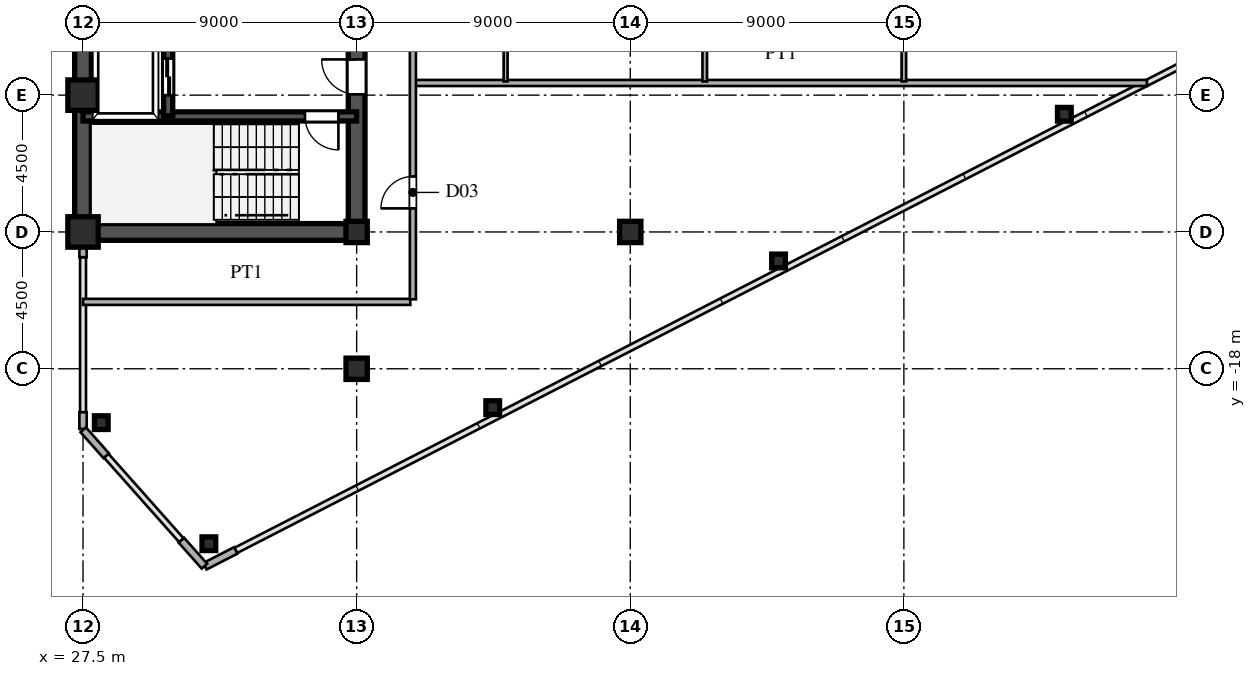
"""IFC4 building model, lengths in metres.
Left out: names, types, materials, properties, quantities, classifications, styles, units other than length and angle.
Written with IfcOpenShell. Run it as: python <this file> out.ifc"""

import sys

from ifc_helpers import new_model, si_unit, direction, frame, frame_2d, origin, origin_2d, place, context, subcontext, project, spatial, rectangle, hollow_rectangle, i_section, extrude, source, transform, mapped, element, fill, save


model = new_model("IFC4")
c1 = context("Model", 3, precision=1e-05, world=origin(), true_north=direction((0.0, 1.0)))
c2 = subcontext(c1, "Body", "Model", "MODEL_VIEW")
j1 = project(units=[si_unit("LENGTHUNIT", "METRE"), si_unit("PLANEANGLEUNIT", "RADIAN")], contexts=[c1])
p1 = place(None, origin())
s1 = spatial("IfcSite", under=j1, at=p1, CompositionType="ELEMENT")
p2 = place(p1, origin())
s2 = spatial("IfcBuilding", under=s1, at=p2, CompositionType="ELEMENT")
p3 = place(p2, frame((0.0, 0.0, 151.2)))
s3 = spatial("IfcBuildingStorey", under=s2, at=p3, CompositionType="ELEMENT", Elevation=151.2)
m1 = source(origin(), c2, "Body", "SweptSolid", [
    extrude(hollow_rectangle(XDim=1.0, YDim=1.0, WallThickness=0.042, at=origin_2d()), origin(), (0.0, 0.0, 1.0), 3.6),
])
for number, where, z_axis, x_axis in (
    (1, (27.5, -13.5, 0.0), (0.0, 0.0, 1.0), (1.0, 0.0, 0.0)),
    (2, (27.5, -9.0, 0.0), (0.0, 0.0, 1.0), (1.0, 0.0, 0.0)),
):
    element("IfcColumn", number, at=place(p3, frame(where, z_axis=z_axis, x_axis=x_axis)), inside=s3, PredefinedType="COLUMN", context=c2, shape_type="MappedRepresentation", body=[
        mapped(m1, transform((0.0, 0.0, 0.0), scale=1.0)),
    ])
m2 = source(origin(), c2, "Body", "SweptSolid", [
    extrude(i_section(OverallWidth=0.7, OverallDepth=0.7, WebThickness=0.028, FlangeThickness=0.045, at=origin_2d()), origin(), (0.0, 0.0, 1.0), 3.6),
])
for number, where, z_axis, x_axis in (
    (3, (36.5, -18.0, 0.0), (0.0, 0.0, 1.0), (1.0, 0.0, 0.0)),
    (4, (36.5, -13.5, 0.0), (0.0, 0.0, 1.0), (1.0, 0.0, 0.0)),
    (5, (45.5, -13.5, 0.0), (0.0, 0.0, 1.0), (1.0, 0.0, 0.0)),
):
    element("IfcColumn", number, at=place(p3, frame(where, z_axis=z_axis, x_axis=x_axis)), inside=s3, PredefinedType="COLUMN", context=c2, shape_type="MappedRepresentation", body=[
        mapped(m2, transform((0.0, 0.0, 0.0), scale=1.0)),
    ])
m3 = source(origin(), c2, "Body", "SweptSolid", [
    extrude(hollow_rectangle(XDim=0.45, YDim=0.45, WallThickness=0.018, at=origin_2d()), origin(), (0.0, 0.0, 1.0), 3.6),
])
for number, where, z_axis, x_axis in (
    (6, (31.64, -23.754, 0.0), (0.0, 0.0, 1.0), (1.0, 0.0, 0.0)),
    (7, (28.1, -19.772, 0.0), (0.0, 0.0, 1.0), (1.0, 0.0, 0.0)),
    (8, (40.976, -19.278, 0.0), (0.0, 0.0, 1.0), (1.0, 0.0, 0.0)),
    (9, (50.377, -14.453, 0.0), (0.0, 0.0, 1.0), (1.0, 0.0, 0.0)),
    (10, (59.779, -9.629, 0.0), (0.0, 0.0, 1.0), (1.0, 0.0, 0.0)),
):
    element("IfcColumn", number, at=place(p3, frame(where, z_axis=z_axis, x_axis=x_axis)), inside=s3, PredefinedType="COLUMN", context=c2, shape_type="MappedRepresentation", body=[
        mapped(m3, transform((0.0, 0.0, 0.0), scale=1.0)),
    ])
p4 = place(p3, frame((31.509, -24.495, 0.0), z_axis=(0.0, 0.0, 1.0), x_axis=(0.889797395748, 0.456355776255, 0.0)))
e11 = element("IfcWall", 11, at=p4, inside=s3, PredefinedType="SOLIDWALL", context=c2, shape_type="SweptSolid", body=[
    extrude(rectangle(XDim=1.14, YDim=0.24, at=frame_2d((0.57, 0.0))), origin(), (0.0, 0.0, 1.0), 3.38),
])
p5 = place(p3, frame((27.5, -19.98, 0.0), z_axis=(0.0, 0.0, 1.0), x_axis=(0.0, 1.0, 0.0)))
e12 = element("IfcWall", 12, at=p5, inside=s3, PredefinedType="SOLIDWALL", context=c2, shape_type="SweptSolid", body=[
    extrude(rectangle(XDim=0.55, YDim=0.24, at=frame_2d((0.275, 0.0))), origin(), (0.0, 0.0, 1.0), 3.38),
])
p6 = place(p3, frame((27.5, -14.33, 0.0), z_axis=(0.0, 0.0, 1.0), x_axis=(0.0, 1.0, 0.0)))
e13 = element("IfcWall", 13, at=p6, inside=s3, PredefinedType="SOLIDWALL", context=c2, shape_type="SweptSolid", body=[
    extrude(rectangle(XDim=0.55, YDim=0.24, at=frame_2d((0.275, 0.0))), origin(), (0.0, 0.0, 1.0), 2.88),
])
for number, where, z_axis, x_axis in (
    (14, (27.507, -20.008, 0.0), (0.0, 0.0, 1.0), (0.664, -0.747, 0.0)),
    (15, (30.736, -23.64, 0.0), (0.0, 0.0, 1.0), (0.664, -0.747, 0.0)),
):
    element("IfcWall", number, at=place(p3, frame(where, z_axis=z_axis, x_axis=x_axis)), inside=s3, PredefinedType="SOLIDWALL", context=c2, shape_type="SweptSolid", body=[
        extrude(rectangle(XDim=1.14, YDim=0.24, at=frame_2d((0.57, 0.0))), origin(), (0.0, 0.0, 1.0), 3.38),
    ])
p7 = place(p3, frame((27.5, -13.5, 0.0), z_axis=(0.0, 0.0, 1.0), x_axis=(0.0, 1.0, 0.0)))
e16 = element("IfcWall", 16, at=p7, inside=s3, PredefinedType="SHEAR", context=c2, shape_type="SweptSolid", body=[
    extrude(rectangle(XDim=12.2, YDim=0.55, at=frame_2d((6.1, 0.0))), origin(), (0.0, 0.0, 1.0), 3.38),
])
p8 = place(p3, frame((27.5, -13.5, 0.0), z_axis=(0.0, 0.0, 1.0), x_axis=(1.0, 0.0, 0.0)))
e17 = element("IfcWall", 17, at=p8, inside=s3, PredefinedType="SHEAR", context=c2, shape_type="SweptSolid", body=[
    extrude(rectangle(XDim=9.0, YDim=0.55, at=frame_2d((4.5, 0.0))), origin(), (0.0, 0.0, 1.0), 3.38),
])
p9 = place(p3, frame((36.5, -13.65, 0.0), z_axis=(0.0, 0.0, 1.0), x_axis=(0.0, 1.0, 0.0)))
e18 = element("IfcWall", 18, at=p9, inside=s3, PredefinedType="SHEAR", context=c2, shape_type="SweptSolid", body=[
    extrude(rectangle(XDim=7.15, YDim=0.55, at=frame_2d((3.575, 0.0))), origin(), (0.0, 0.0, 1.0), 3.38),
])
p10 = place(p9, frame((4.675, 0.0, 0.0)))
e19 = element("IfcOpeningElement", 19, at=p10, cuts=e18, PredefinedType="OPENING", context=c2, shape_type="SweptSolid", body=[
    extrude(rectangle(XDim=1.15, YDim=2.2, at=frame_2d((0.575, 1.1))), frame((0.0, 0.285, 0.0), z_axis=(0.0, -1.0, 0.0), x_axis=(1.0, 0.0, 0.0)), (0.0, 0.0, 1.0), 0.57),
])
p11 = place(p3, frame((27.5, -9.7, 0.0), z_axis=(0.0, 0.0, 1.0), x_axis=(1.0, 0.0, 0.0)))
e20 = element("IfcWall", 20, at=p11, inside=s3, PredefinedType="SHEAR", context=c2, shape_type="SweptSolid", body=[
    extrude(rectangle(XDim=9.0, YDim=0.3, at=frame_2d((4.5, 0.0))), origin(), (0.0, 0.0, 1.0), 3.38),
])
p12 = place(p11, frame((7.3, 0.0, 0.0)))
e21 = element("IfcOpeningElement", 21, at=p12, cuts=e20, PredefinedType="OPENING", context=c2, shape_type="SweptSolid", body=[
    extrude(rectangle(XDim=1.1, YDim=2.2, at=frame_2d((0.55, 1.1))), frame((0.0, 0.16, 0.0), z_axis=(0.0, -1.0, 0.0), x_axis=(1.0, 0.0, 0.0)), (0.0, 0.0, 1.0), 0.32),
])
p13 = place(p3, frame((30.3, -9.68, 0.0), z_axis=(0.0, 0.0, 1.0), x_axis=(0.0, 1.0, 0.0)))
e22 = element("IfcWall", 22, at=p13, inside=s3, PredefinedType="SHEAR", context=c2, shape_type="SweptSolid", body=[
    extrude(rectangle(XDim=2.56, YDim=0.3, at=frame_2d((1.28, 0.0))), origin(), (0.0, 0.0, 1.0), 3.38),
])
p14 = place(p13, frame((0.68, 0.0, 0.0)))
e23 = element("IfcOpeningElement", 23, at=p14, cuts=e22, PredefinedType="OPENING", context=c2, shape_type="SweptSolid", body=[
    extrude(rectangle(XDim=1.2, YDim=2.25, at=frame_2d((0.6, 1.125))), frame((0.0, 0.16, 0.0), z_axis=(0.0, -1.0, 0.0), x_axis=(1.0, 0.0, 0.0)), (0.0, 0.0, 1.0), 0.32),
])
p15 = place(p3, frame((27.5, -15.8, 0.0), z_axis=(0.0, 0.0, 1.0), x_axis=(1.0, 0.0, 0.0)))
e24 = element("IfcWall", 24, at=p15, inside=s3, PredefinedType="PARTITIONING", context=c2, shape_type="SweptSolid", body=[
    extrude(rectangle(XDim=10.765, YDim=0.2, at=frame_2d((5.382, 0.0))), origin(), (0.0, 0.0, 1.0), 3.38),
])
p16 = place(p3, frame((38.43, -8.6, 0.0), z_axis=(0.0, 0.0, 1.0), x_axis=(1.0, 0.0, 0.0)))
e25 = element("IfcWall", 25, at=p16, inside=s3, PredefinedType="PARTITIONING", context=c2, shape_type="SweptSolid", body=[
    extrude(rectangle(XDim=24.066, YDim=0.2, at=frame_2d((12.033, 0.0))), origin(), (0.0, 0.0, 1.0), 3.38),
])
p17 = place(p3, frame((38.35, -15.715, 0.0), z_axis=(0.0, 0.0, 1.0), x_axis=(0.0, 1.0, 0.0)))
e26 = element("IfcWall", 26, at=p17, inside=s3, PredefinedType="PARTITIONING", context=c2, shape_type="SweptSolid", body=[
    extrude(rectangle(XDim=31.43, YDim=0.2, at=frame_2d((15.715, 0.0))), origin(), (0.0, 0.0, 1.0), 3.38),
])
p18 = place(p17, frame((2.99, 0.0, 0.0)))
e27 = element("IfcOpeningElement", 27, at=p18, cuts=e26, PredefinedType="OPENING", context=c2, shape_type="SweptSolid", body=[
    extrude(rectangle(XDim=1.05, YDim=2.25, at=frame_2d((0.525, 1.125))), frame((0.0, 0.11, 0.0), z_axis=(0.0, -1.0, 0.0), x_axis=(1.0, 0.0, 0.0)), (0.0, 0.0, 1.0), 0.22),
])
p19 = place(p17, frame((12.895, 0.0, 0.0)))
e28 = element("IfcOpeningElement", 28, at=p19, cuts=e26, PredefinedType="OPENING", context=c2, shape_type="SweptSolid", body=[
    extrude(rectangle(XDim=1.05, YDim=2.25, at=frame_2d((0.525, 1.125))), frame((0.0, 0.11, 0.0), z_axis=(0.0, -1.0, 0.0), x_axis=(1.0, 0.0, 0.0)), (0.0, 0.0, 1.0), 0.22),
])
p20 = place(p17, frame((20.988, 0.0, 0.0)))
e29 = element("IfcOpeningElement", 29, at=p20, cuts=e26, PredefinedType="OPENING", context=c2, shape_type="SweptSolid", body=[
    extrude(rectangle(XDim=1.05, YDim=2.25, at=frame_2d((0.525, 1.125))), frame((0.0, 0.11, 0.0), z_axis=(0.0, -1.0, 0.0), x_axis=(1.0, 0.0, 0.0)), (0.0, 0.0, 1.0), 0.22),
])
p21 = place(p3, frame((41.4, -8.55, 0.0), z_axis=(0.0, 0.0, 1.0), x_axis=(0.0, 1.0, 0.0)))
e30 = element("IfcWall", 30, at=p21, inside=s3, PredefinedType="PARTITIONING", context=c2, shape_type="SweptSolid", body=[
    extrude(rectangle(XDim=3.408, YDim=0.13, at=frame_2d((1.704, 0.0))), origin(), (0.0, 0.0, 1.0), 3.38),
])
p22 = place(p3, frame((47.95, -8.55, 0.0), z_axis=(0.0, 0.0, 1.0), x_axis=(0.0, 1.0, 0.0)))
e31 = element("IfcWall", 31, at=p22, inside=s3, PredefinedType="PARTITIONING", context=c2, shape_type="SweptSolid", body=[
    extrude(rectangle(XDim=22.913, YDim=0.15, at=frame_2d((11.457, 0.0))), origin(), (0.0, 0.0, 1.0), 3.38),
])
p23 = place(p22, frame((5.975, 0.0, 0.0)))
e32 = element("IfcOpeningElement", 32, at=p23, cuts=e31, PredefinedType="OPENING", context=c2, shape_type="SweptSolid", body=[
    extrude(rectangle(XDim=0.95, YDim=2.15, at=frame_2d((0.475, 1.075))), frame((0.0, 0.085, 0.0), z_axis=(0.0, -1.0, 0.0), x_axis=(1.0, 0.0, 0.0)), (0.0, 0.0, 1.0), 0.17),
])
p24 = place(p22, frame((1.642, 0.0, 0.0)))
e33 = element("IfcOpeningElement", 33, at=p24, cuts=e31, PredefinedType="OPENING", context=c2, shape_type="SweptSolid", body=[
    extrude(rectangle(XDim=0.95, YDim=2.15, at=frame_2d((0.475, 1.075))), frame((0.0, 0.085, 0.0), z_axis=(0.0, -1.0, 0.0), x_axis=(1.0, 0.0, 0.0)), (0.0, 0.0, 1.0), 0.17),
])
p25 = place(p22, frame((14.978, 0.0, 0.0)))
e34 = element("IfcOpeningElement", 34, at=p25, cuts=e31, PredefinedType="OPENING", context=c2, shape_type="SweptSolid", body=[
    extrude(rectangle(XDim=0.95, YDim=2.15, at=frame_2d((0.475, 1.075))), frame((0.0, 0.085, 0.0), z_axis=(0.0, -1.0, 0.0), x_axis=(1.0, 0.0, 0.0)), (0.0, 0.0, 1.0), 0.17),
])
p26 = place(p3, frame((54.5, -8.55, 0.0), z_axis=(0.0, 0.0, 1.0), x_axis=(0.0, 1.0, 0.0)))
e35 = element("IfcWall", 35, at=p26, inside=s3, PredefinedType="PARTITIONING", context=c2, shape_type="SweptSolid", body=[
    extrude(rectangle(XDim=21.282, YDim=0.15, at=frame_2d((10.641, 0.0))), origin(), (0.0, 0.0, 1.0), 2.78),
])
p27 = place(p26, frame((5.975, 0.0, 0.0)))
e36 = element("IfcOpeningElement", 36, at=p27, cuts=e35, PredefinedType="OPENING", context=c2, shape_type="SweptSolid", body=[
    extrude(rectangle(XDim=0.95, YDim=2.15, at=frame_2d((0.475, 1.075))), frame((0.0, 0.085, 0.0), z_axis=(0.0, -1.0, 0.0), x_axis=(1.0, 0.0, 0.0)), (0.0, 0.0, 1.0), 0.17),
])
p28 = place(p26, frame((10.308, 0.0, 0.0)))
e37 = element("IfcOpeningElement", 37, at=p28, cuts=e35, PredefinedType="OPENING", context=c2, shape_type="SweptSolid", body=[
    extrude(rectangle(XDim=0.95, YDim=2.15, at=frame_2d((0.475, 1.075))), frame((0.0, 0.085, 0.0), z_axis=(0.0, -1.0, 0.0), x_axis=(1.0, 0.0, 0.0)), (0.0, 0.0, 1.0), 0.17),
])
p29 = place(p26, frame((14.978, 0.0, 0.0)))
e38 = element("IfcOpeningElement", 38, at=p29, cuts=e35, PredefinedType="OPENING", context=c2, shape_type="SweptSolid", body=[
    extrude(rectangle(XDim=0.95, YDim=2.15, at=frame_2d((0.475, 1.075))), frame((0.0, 0.085, 0.0), z_axis=(0.0, -1.0, 0.0), x_axis=(1.0, 0.0, 0.0)), (0.0, 0.0, 1.0), 0.17),
])
m4 = source(origin(), c2, "Body", "SweptSolid", [
    extrude(rectangle(XDim=1.15, YDim=2.2, at=frame_2d((0.575, 1.1))), frame((0.0, 0.025, 0.0), z_axis=(0.0, -1.0, 0.0), x_axis=(1.0, 0.0, 0.0)), (0.0, 0.0, 1.0), 0.05),
])
p30 = place(p10, origin())
e39 = element("IfcDoor", 39, at=p30, inside=s3, OperationType="SINGLE_SWING_RIGHT", PredefinedType="DOOR", context=c2, shape_type="MappedRepresentation", body=[
    mapped(m4, transform((0.0, 0.0, 0.0), scale=1.0)),
])
fill(e19, e39)
m5 = source(origin(), c2, "Body", "SweptSolid", [
    extrude(rectangle(XDim=1.1, YDim=2.2, at=frame_2d((0.55, 1.1))), frame((0.0, 0.025, 0.0), z_axis=(0.0, -1.0, 0.0), x_axis=(1.0, 0.0, 0.0)), (0.0, 0.0, 1.0), 0.05),
])
p31 = place(p12, frame((1.1, 0.0, 0.0), z_axis=(0.0, 0.0, 1.0), x_axis=(-1.0, 0.0, 0.0)))
e40 = element("IfcDoor", 40, at=p31, inside=s3, OperationType="SINGLE_SWING_RIGHT", PredefinedType="DOOR", context=c2, shape_type="MappedRepresentation", body=[
    mapped(m5, transform((0.0, 0.0, 0.0), scale=1.0)),
])
fill(e21, e40)
m6 = source(origin(), c2, "Body", "SweptSolid", [
    extrude(rectangle(XDim=1.2, YDim=2.25, at=frame_2d((0.6, 1.125))), frame((0.0, 0.025, 0.0), z_axis=(0.0, -1.0, 0.0), x_axis=(1.0, 0.0, 0.0)), (0.0, 0.0, 1.0), 0.05),
])
p32 = place(p14, origin())
e41 = element("IfcDoor", 41, at=p32, inside=s3, OperationType="DOUBLE_DOOR_SLIDING", PredefinedType="DOOR", context=c2, shape_type="MappedRepresentation", body=[
    mapped(m6, transform((0.0, 0.0, 0.0), scale=1.0)),
])
fill(e23, e41)
m7 = source(origin(), c2, "Body", "SweptSolid", [
    extrude(rectangle(XDim=1.05, YDim=2.25, at=frame_2d((0.525, 1.125))), frame((0.0, 0.025, 0.0), z_axis=(0.0, -1.0, 0.0), x_axis=(1.0, 0.0, 0.0)), (0.0, 0.0, 1.0), 0.05),
])
p33 = place(p18, origin())
e42 = element("IfcDoor", 42, at=p33, inside=s3, OperationType="SINGLE_SWING_LEFT", PredefinedType="DOOR", context=c2, shape_type="MappedRepresentation", body=[
    mapped(m7, transform((0.0, 0.0, 0.0), scale=1.0)),
])
fill(e27, e42)
save(model, sys.argv[1])
